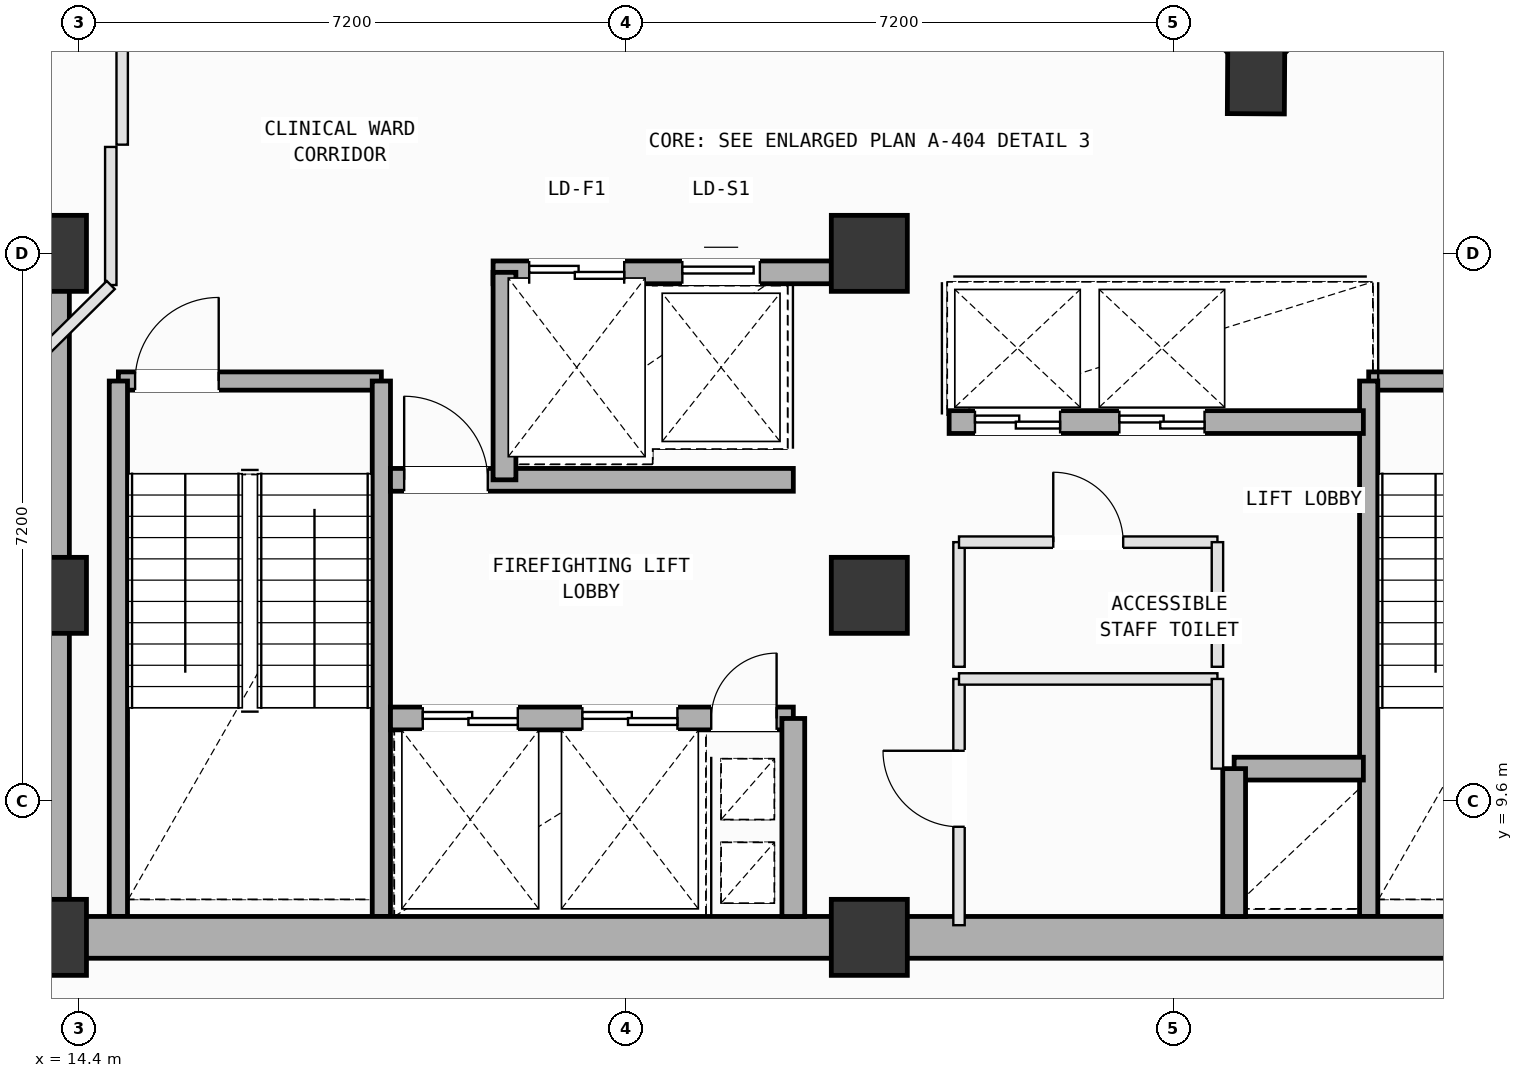
"""IFC4 building model, lengths in metres.
Left out: names, types, materials, properties, quantities, classifications, styles, units other than length and angle.
Written with IfcOpenShell. Run it as: python <this file> out.ifc"""

import sys

from ifc_helpers import new_model, si_unit, direction, frame, frame_2d, origin, origin_2d, place, context, subcontext, project, spatial, rectangle, extrude, element, fill, save


model = new_model("IFC4")
c1 = context("Model", 3, precision=1e-05, world=origin(), true_north=direction((0.0, 1.0)))
c2 = subcontext(c1, "Body", "Model", "MODEL_VIEW")
j1 = project(units=[si_unit("LENGTHUNIT", "METRE"), si_unit("PLANEANGLEUNIT", "RADIAN")], contexts=[c1])
p1 = place(None, origin())
s1 = spatial("IfcSite", under=j1, at=p1, CompositionType="ELEMENT")
p2 = place(p1, origin())
s2 = spatial("IfcBuilding", under=s1, at=p2, CompositionType="ELEMENT")
p3 = place(p2, frame((0.0, 0.0, 215.2)))
s3 = spatial("IfcBuildingStorey", under=s2, at=p3, CompositionType="ELEMENT", Elevation=215.2)
for number, where, z_axis, x_axis in (
    (1, (14.0, 7.8, 0.0), (0.0, 0.0, 1.0), (1.0, 0.0, 0.0)),
    (2, (14.0, 12.3, 0.0), (0.0, 0.0, 1.0), (1.0, 0.0, 0.0)),
    (3, (14.0, 16.8, 0.0), (0.0, 0.0, 1.0), (1.0, 0.0, 0.0)),
    (4, (24.8, 7.8, 0.0), (0.0, 0.0, 1.0), (1.0, 0.0, 0.0)),
    (5, (24.8, 12.3, 0.0), (0.0, 0.0, 1.0), (1.0, 0.0, 0.0)),
    (6, (24.8, 16.8, 0.0), (0.0, 0.0, 1.0), (1.0, 0.0, 0.0)),
):
    element("IfcColumn", number, at=place(p3, frame(where, z_axis=z_axis, x_axis=x_axis)), inside=s3, PredefinedType="COLUMN", context=c2, shape_type="SweptSolid", body=[
        extrude(rectangle(XDim=1.0, YDim=1.0, at=origin_2d()), origin(), (0.0, 0.0, 1.0), 4.0),
    ])
p4 = place(p3, frame((29.889, 19.236, 0.002), z_axis=(0.023205698391, -0.015144771581, 0.999615991997), x_axis=(-0.83375940471, 0.551432149195, 0.027709924051)))
e7 = element("IfcColumn", 7, at=p4, inside=s3, PredefinedType="COLUMN", context=c2, shape_type="SweptSolid", body=[
    extrude(rectangle(XDim=1.2, YDim=0.75, at=origin_2d()), origin(), (0.0, 0.0, 1.0), 3.998),
])
p5 = place(p3, frame((30.177, 19.521, 0.0), z_axis=(0.0, 0.0, 1.0), x_axis=(0.711415033641, 0.702772118051, 0.0)))
e8 = element("IfcWall", 8, at=p5, inside=s3, PredefinedType="SOLIDWALL", context=c2, shape_type="SweptSolid", body=[
    extrude(rectangle(XDim=6.158, YDim=0.28, at=frame_2d((3.079, 0.0))), origin(), (0.0, 0.0, 1.0), 3.165),
])
p6 = place(p5, frame((3.587, 0.0, 0.75)))
e9 = element("IfcOpeningElement", 9, at=p6, cuts=e8, PredefinedType="OPENING", context=c2, shape_type="SweptSolid", body=[
    extrude(rectangle(XDim=1.4, YDim=1.85, at=frame_2d((0.7, 0.925))), frame((0.0, 0.15, 0.0), z_axis=(0.0, -1.0, 0.0), x_axis=(1.0, 0.0, 0.0)), (0.0, 0.0, 1.0), 0.3),
])
p7 = place(p3, frame((24.758, 24.431, 0.0), z_axis=(0.0, 0.0, 1.0), x_axis=(0.702777784816, -0.711409435676, 0.0)))
e10 = element("IfcWall", 10, at=p7, inside=s3, PredefinedType="SOLIDWALL", context=c2, shape_type="SweptSolid", body=[
    extrude(rectangle(XDim=6.958, YDim=0.28, at=frame_2d((3.479, 0.0))), origin(), (0.0, 0.0, 1.0), 3.245),
])
p8 = place(p3, frame((14.92, 15.12, 0.0), z_axis=(0.0, 0.0, 1.0), x_axis=(1.0, 0.0, 0.0)))
e11 = element("IfcWall", 11, at=p8, inside=s3, PredefinedType="SOLIDWALL", context=c2, shape_type="SweptSolid", body=[
    extrude(rectangle(XDim=3.46, YDim=0.24, at=frame_2d((1.73, 0.0))), origin(), (0.0, 0.0, 1.0), 3.78),
])
p9 = place(p8, frame((0.22, 0.0, 0.0)))
e12 = element("IfcOpeningElement", 12, at=p9, cuts=e11, PredefinedType="OPENING", context=c2, shape_type="SweptSolid", body=[
    extrude(rectangle(XDim=1.1, YDim=2.15, at=frame_2d((0.55, 1.075))), frame((0.0, 0.13, 0.0), z_axis=(0.0, -1.0, 0.0), x_axis=(1.0, 0.0, 0.0)), (0.0, 0.0, 1.0), 0.26),
])
for number, where, z_axis, x_axis in (
    (13, (18.38, 15.12, 0.0), (0.0, 0.0, 1.0), (0.0, -1.0, 0.0)),
    (14, (14.92, 8.075, 0.0), (0.0, 0.0, 1.0), (0.0, 1.0, 0.0)),
):
    element("IfcWall", number, at=place(p3, frame(where, z_axis=z_axis, x_axis=x_axis)), inside=s3, PredefinedType="SOLIDWALL", context=c2, shape_type="SweptSolid", body=[
        extrude(rectangle(XDim=7.045, YDim=0.24, at=frame_2d((3.522, 0.0))), origin(), (0.0, 0.0, 1.0), 3.78),
    ])
p10 = place(p3, frame((31.37, 15.12, 0.0), z_axis=(0.0, 0.0, 1.0), x_axis=(1.0, 0.0, 0.0)))
e15 = element("IfcWall", 15, at=p10, inside=s3, PredefinedType="SOLIDWALL", context=c2, shape_type="SweptSolid", body=[
    extrude(rectangle(XDim=3.46, YDim=0.24, at=frame_2d((1.73, 0.0))), origin(), (0.0, 0.0, 1.0), 3.78),
])
p11 = place(p10, frame((2.14, 0.0, 0.0)))
e16 = element("IfcOpeningElement", 16, at=p11, cuts=e15, PredefinedType="OPENING", context=c2, shape_type="SweptSolid", body=[
    extrude(rectangle(XDim=1.1, YDim=2.15, at=frame_2d((0.55, 1.075))), frame((0.0, 0.13, 0.0), z_axis=(0.0, -1.0, 0.0), x_axis=(1.0, 0.0, 0.0)), (0.0, 0.0, 1.0), 0.26),
])
p12 = place(p3, frame((31.37, 8.075, 0.0), z_axis=(0.0, 0.0, 1.0), x_axis=(0.0, 1.0, 0.0)))
e17 = element("IfcWall", 17, at=p12, inside=s3, PredefinedType="SOLIDWALL", context=c2, shape_type="SweptSolid", body=[
    extrude(rectangle(XDim=7.045, YDim=0.24, at=frame_2d((3.522, 0.0))), origin(), (0.0, 0.0, 1.0), 3.78),
])
for number, where, z_axis, x_axis in (
    (18, (14.0, 7.8, 0.0), (0.0, 0.0, 1.0), (1.0, 0.0, 0.0)),
    (19, (24.8, 7.8, 0.0), (0.0, 0.0, 1.0), (1.0, 0.0, 0.0)),
):
    element("IfcWall", number, at=place(p3, frame(where, z_axis=z_axis, x_axis=x_axis)), inside=s3, PredefinedType="SHEAR", context=c2, shape_type="SweptSolid", body=[
        extrude(rectangle(XDim=10.8, YDim=0.55, at=frame_2d((5.4, 0.0))), origin(), (0.0, 0.0, 1.0), 3.78),
    ])
p13 = place(p3, frame((14.0, 16.8, 0.0), z_axis=(0.0, 0.0, 1.0), x_axis=(0.0, -1.0, 0.0)))
e20 = element("IfcWall", 20, at=p13, inside=s3, PredefinedType="SHEAR", context=c2, shape_type="SweptSolid", body=[
    extrude(rectangle(XDim=9.0, YDim=0.55, at=frame_2d((4.5, 0.0))), origin(), (0.0, 0.0, 1.0), 3.78),
])
p14 = place(p3, frame((19.85, 16.55, 0.0), z_axis=(0.0, 0.0, 1.0), x_axis=(1.0, 0.0, 0.0)))
e21 = element("IfcWall", 21, at=p14, inside=s3, PredefinedType="SOLIDWALL", context=c2, shape_type="SweptSolid", body=[
    extrude(rectangle(XDim=4.45, YDim=0.3, at=frame_2d((2.225, 0.0))), origin(), (0.0, 0.0, 1.0), 3.78),
])
p15 = place(p14, frame((0.475, 0.0, 0.0)))
e22 = element("IfcOpeningElement", 22, at=p15, cuts=e21, PredefinedType="OPENING", context=c2, shape_type="SweptSolid", body=[
    extrude(rectangle(XDim=1.25, YDim=2.18, at=frame_2d((0.625, 1.09))), frame((0.0, 0.16, 0.0), z_axis=(0.0, -1.0, 0.0), x_axis=(1.0, 0.0, 0.0)), (0.0, 0.0, 1.0), 0.32),
])
p16 = place(p14, frame((2.49, 0.0, 0.0)))
e23 = element("IfcOpeningElement", 23, at=p16, cuts=e21, PredefinedType="OPENING", context=c2, shape_type="SweptSolid", body=[
    extrude(rectangle(XDim=1.02, YDim=2.12, at=frame_2d((0.51, 1.06))), frame((0.0, 0.16, 0.0), z_axis=(0.0, -1.0, 0.0), x_axis=(1.0, 0.0, 0.0)), (0.0, 0.0, 1.0), 0.32),
])
p17 = place(p3, frame((18.5, 10.68, 0.0), z_axis=(0.0, 0.0, 1.0), x_axis=(1.0, 0.0, 0.0)))
e24 = element("IfcWall", 24, at=p17, inside=s3, PredefinedType="SOLIDWALL", context=c2, shape_type="SweptSolid", body=[
    extrude(rectangle(XDim=5.3, YDim=0.3, at=frame_2d((2.65, 0.0))), origin(), (0.0, 0.0, 1.0), 3.78),
])
p18 = place(p17, frame((4.22, 0.0, 0.0)))
e25 = element("IfcOpeningElement", 25, at=p18, cuts=e24, PredefinedType="OPENING", context=c2, shape_type="SweptSolid", body=[
    extrude(rectangle(XDim=0.86, YDim=2.06, at=frame_2d((0.43, 1.03))), frame((0.0, 0.16, 0.0), z_axis=(0.0, -1.0, 0.0), x_axis=(1.0, 0.0, 0.0)), (0.0, 0.0, 1.0), 0.32),
])
p19 = place(p17, frame((0.425, 0.0, 0.0)))
e26 = element("IfcOpeningElement", 26, at=p19, cuts=e24, PredefinedType="OPENING", context=c2, shape_type="SweptSolid", body=[
    extrude(rectangle(XDim=1.25, YDim=2.18, at=frame_2d((0.625, 1.09))), frame((0.0, 0.16, 0.0), z_axis=(0.0, -1.0, 0.0), x_axis=(1.0, 0.0, 0.0)), (0.0, 0.0, 1.0), 0.32),
])
p20 = place(p17, frame((2.525, 0.0, 0.0)))
e27 = element("IfcOpeningElement", 27, at=p20, cuts=e24, PredefinedType="OPENING", context=c2, shape_type="SweptSolid", body=[
    extrude(rectangle(XDim=1.25, YDim=2.18, at=frame_2d((0.625, 1.09))), frame((0.0, 0.16, 0.0), z_axis=(0.0, -1.0, 0.0), x_axis=(1.0, 0.0, 0.0)), (0.0, 0.0, 1.0), 0.32),
])
p21 = place(p3, frame((18.5, 13.82, 0.0), z_axis=(0.0, 0.0, 1.0), x_axis=(1.0, 0.0, 0.0)))
e28 = element("IfcWall", 28, at=p21, inside=s3, PredefinedType="SOLIDWALL", context=c2, shape_type="SweptSolid", body=[
    extrude(rectangle(XDim=5.3, YDim=0.3, at=frame_2d((2.65, 0.0))), origin(), (0.0, 0.0, 1.0), 3.78),
])
p22 = place(p21, frame((0.18, 0.0, 0.0)))
e29 = element("IfcOpeningElement", 29, at=p22, cuts=e28, PredefinedType="OPENING", context=c2, shape_type="SweptSolid", body=[
    extrude(rectangle(XDim=1.1, YDim=2.15, at=frame_2d((0.55, 1.075))), frame((0.0, 0.16, 0.0), z_axis=(0.0, -1.0, 0.0), x_axis=(1.0, 0.0, 0.0)), (0.0, 0.0, 1.0), 0.32),
])
p23 = place(p3, frame((23.8, 8.075, 0.0), z_axis=(0.0, 0.0, 1.0), x_axis=(0.0, 1.0, 0.0)))
e30 = element("IfcWall", 30, at=p23, inside=s3, PredefinedType="SOLIDWALL", context=c2, shape_type="SweptSolid", body=[
    extrude(rectangle(XDim=2.605, YDim=0.3, at=frame_2d((1.302, 0.0))), origin(), (0.0, 0.0, 1.0), 3.78),
])
p24 = place(p3, frame((20.0, 13.82, 0.0), z_axis=(0.0, 0.0, 1.0), x_axis=(0.0, 1.0, 0.0)))
e31 = element("IfcWall", 31, at=p24, inside=s3, PredefinedType="SOLIDWALL", context=c2, shape_type="SweptSolid", body=[
    extrude(rectangle(XDim=2.73, YDim=0.3, at=frame_2d((1.365, 0.0))), origin(), (0.0, 0.0, 1.0), 3.78),
])
p25 = place(p3, frame((29.6, 10.02, 0.0), z_axis=(0.0, 0.0, 1.0), x_axis=(1.0, 0.0, 0.0)))
e32 = element("IfcWall", 32, at=p25, inside=s3, PredefinedType="SOLIDWALL", context=c2, shape_type="SweptSolid", body=[
    extrude(rectangle(XDim=1.7, YDim=0.3, at=frame_2d((0.85, 0.0))), origin(), (0.0, 0.0, 1.0), 3.78),
])
p26 = place(p3, frame((29.6, 8.075, 0.0), z_axis=(0.0, 0.0, 1.0), x_axis=(0.0, 1.0, 0.0)))
e33 = element("IfcWall", 33, at=p26, inside=s3, PredefinedType="SOLIDWALL", context=c2, shape_type="SweptSolid", body=[
    extrude(rectangle(XDim=1.945, YDim=0.3, at=frame_2d((0.973, 0.0))), origin(), (0.0, 0.0, 1.0), 3.78),
])
p27 = place(p3, frame((25.85, 14.58, 0.0), z_axis=(0.0, 0.0, 1.0), x_axis=(1.0, 0.0, 0.0)))
e34 = element("IfcWall", 34, at=p27, inside=s3, PredefinedType="SOLIDWALL", context=c2, shape_type="SweptSolid", body=[
    extrude(rectangle(XDim=5.45, YDim=0.3, at=frame_2d((2.725, 0.0))), origin(), (0.0, 0.0, 1.0), 3.78),
])
p28 = place(p27, frame((0.34, 0.0, 0.0)))
e35 = element("IfcOpeningElement", 35, at=p28, cuts=e34, PredefinedType="OPENING", context=c2, shape_type="SweptSolid", body=[
    extrude(rectangle(XDim=1.12, YDim=2.15, at=frame_2d((0.56, 1.075))), frame((0.0, 0.16, 0.0), z_axis=(0.0, -1.0, 0.0), x_axis=(1.0, 0.0, 0.0)), (0.0, 0.0, 1.0), 0.32),
])
p29 = place(p27, frame((2.24, 0.0, 0.0)))
e36 = element("IfcOpeningElement", 36, at=p29, cuts=e34, PredefinedType="OPENING", context=c2, shape_type="SweptSolid", body=[
    extrude(rectangle(XDim=1.12, YDim=2.15, at=frame_2d((0.56, 1.075))), frame((0.0, 0.16, 0.0), z_axis=(0.0, -1.0, 0.0), x_axis=(1.0, 0.0, 0.0)), (0.0, 0.0, 1.0), 0.32),
])
p30 = place(p3, frame((25.98, 7.96, 0.0), z_axis=(0.0, 0.0, 1.0), x_axis=(0.0, 1.0, 0.0)))
e37 = element("IfcWall", 37, at=p30, inside=s3, PredefinedType="PARTITIONING", context=c2, shape_type="SweptSolid", body=[
    extrude(rectangle(XDim=3.24, YDim=0.15, at=frame_2d((1.62, 0.0))), origin(), (0.0, 0.0, 1.0), 3.78),
])
p31 = place(p30, frame((1.295, 0.0, 0.0)))
e38 = element("IfcOpeningElement", 38, at=p31, cuts=e37, PredefinedType="OPENING", context=c2, shape_type="SweptSolid", body=[
    extrude(rectangle(XDim=1.0, YDim=2.12, at=frame_2d((0.5, 1.06))), frame((0.0, 0.085, 0.0), z_axis=(0.0, -1.0, 0.0), x_axis=(1.0, 0.0, 0.0)), (0.0, 0.0, 1.0), 0.17),
])
p32 = place(p3, frame((25.98, 11.2, 0.0), z_axis=(0.0, 0.0, 1.0), x_axis=(1.0, 0.0, 0.0)))
e39 = element("IfcWall", 39, at=p32, inside=s3, PredefinedType="PARTITIONING", context=c2, shape_type="SweptSolid", body=[
    extrude(rectangle(XDim=3.4, YDim=0.15, at=frame_2d((1.7, 0.0))), origin(), (0.0, 0.0, 1.0), 3.78),
])
p33 = place(p3, frame((29.38, 11.2, 0.0), z_axis=(0.0, 0.0, 1.0), x_axis=(0.0, -1.0, 0.0)))
e40 = element("IfcWall", 40, at=p33, inside=s3, PredefinedType="PARTITIONING", context=c2, shape_type="SweptSolid", body=[
    extrude(rectangle(XDim=1.18, YDim=0.15, at=frame_2d((0.59, 0.0))), origin(), (0.0, 0.0, 1.0), 3.78),
])
p34 = place(p3, frame((25.98, 11.36, 0.0), z_axis=(0.0, 0.0, 1.0), x_axis=(0.0, 1.0, 0.0)))
e41 = element("IfcWall", 41, at=p34, inside=s3, PredefinedType="PARTITIONING", context=c2, shape_type="SweptSolid", body=[
    extrude(rectangle(XDim=1.64, YDim=0.15, at=frame_2d((0.82, 0.0))), origin(), (0.0, 0.0, 1.0), 3.78),
])
p35 = place(p3, frame((25.98, 13.0, 0.0), z_axis=(0.0, 0.0, 1.0), x_axis=(1.0, 0.0, 0.0)))
e42 = element("IfcWall", 42, at=p35, inside=s3, PredefinedType="PARTITIONING", context=c2, shape_type="SweptSolid", body=[
    extrude(rectangle(XDim=3.4, YDim=0.15, at=frame_2d((1.7, 0.0))), origin(), (0.0, 0.0, 1.0), 3.78),
])
p36 = place(p35, frame((1.24, 0.0, 0.0)))
e43 = element("IfcOpeningElement", 43, at=p36, cuts=e42, PredefinedType="OPENING", context=c2, shape_type="SweptSolid", body=[
    extrude(rectangle(XDim=0.92, YDim=2.1, at=frame_2d((0.46, 1.05))), frame((0.0, 0.085, 0.0), z_axis=(0.0, -1.0, 0.0), x_axis=(1.0, 0.0, 0.0)), (0.0, 0.0, 1.0), 0.17),
])
p37 = place(p3, frame((29.38, 13.0, 0.0), z_axis=(0.0, 0.0, 1.0), x_axis=(0.0, -1.0, 0.0)))
e44 = element("IfcWall", 44, at=p37, inside=s3, PredefinedType="PARTITIONING", context=c2, shape_type="SweptSolid", body=[
    extrude(rectangle(XDim=1.64, YDim=0.15, at=frame_2d((0.82, 0.0))), origin(), (0.0, 0.0, 1.0), 3.78),
])
p38 = place(p3, frame((14.97, 20.55, 0.0), z_axis=(0.0, 0.0, 1.0), x_axis=(0.0, -1.0, 0.0)))
e45 = element("IfcWall", 45, at=p38, inside=s3, PredefinedType="PARTITIONING", context=c2, shape_type="SweptSolid", body=[
    extrude(rectangle(XDim=2.32, YDim=0.15, at=frame_2d((1.16, 0.0))), origin(), (0.0, 0.0, 1.0), 3.78),
])
p39 = place(p3, frame((14.82, 18.2, 0.0), z_axis=(0.0, 0.0, 1.0), x_axis=(0.0, -1.0, 0.0)))
e46 = element("IfcWall", 46, at=p39, inside=s3, PredefinedType="PARTITIONING", context=c2, shape_type="SweptSolid", body=[
    extrude(rectangle(XDim=1.817, YDim=0.15, at=frame_2d((0.908, 0.0))), origin(), (0.0, 0.0, 1.0), 3.78),
])
p40 = place(p3, frame((14.82, 16.383, 0.0), z_axis=(0.0, 0.0, 1.0), x_axis=(-0.711463271884, -0.702723283206, 0.0)))
e47 = element("IfcWall", 47, at=p40, inside=s3, PredefinedType="PARTITIONING", context=c2, shape_type="SweptSolid", body=[
    extrude(rectangle(XDim=1.732, YDim=0.15, at=frame_2d((0.866, 0.0))), origin(), (0.0, 0.0, 1.0), 3.78),
])
p41 = place(p3, frame((5.544, 14.305, 0.0), z_axis=(0.0, 0.0, 1.0), x_axis=(0.711434510245, 0.702752401371, 0.0)))
e48 = element("IfcWall", 48, at=p41, inside=s3, PredefinedType="PARTITIONING", context=c2, shape_type="SweptSolid", body=[
    extrude(rectangle(XDim=15.185, YDim=0.15, at=frame_2d((7.592, 0.0))), origin(), (0.0, 0.0, 1.0), 3.78),
])
p42 = place(p9, origin())
e49 = element("IfcDoor", 49, at=p42, inside=s3, OperationType="SINGLE_SWING_RIGHT", PredefinedType="DOOR", context=c2, shape_type="SweptSolid", body=[
    extrude(rectangle(XDim=1.1, YDim=2.15, at=frame_2d((0.55, 1.075))), frame((0.0, 0.025, 0.0), z_axis=(0.0, -1.0, 0.0), x_axis=(1.0, 0.0, 0.0)), (0.0, 0.0, 1.0), 0.05),
])
fill(e12, e49)
p43 = place(p18, origin())
e50 = element("IfcDoor", 50, at=p43, inside=s3, OperationType="SINGLE_SWING_RIGHT", PredefinedType="DOOR", context=c2, shape_type="SweptSolid", body=[
    extrude(rectangle(XDim=0.86, YDim=2.06, at=frame_2d((0.43, 1.03))), frame((0.0, 0.025, 0.0), z_axis=(0.0, -1.0, 0.0), x_axis=(1.0, 0.0, 0.0)), (0.0, 0.0, 1.0), 0.05),
])
fill(e25, e50)
p44 = place(p22, origin())
e51 = element("IfcDoor", 51, at=p44, inside=s3, OperationType="SINGLE_SWING_LEFT", PredefinedType="DOOR", context=c2, shape_type="SweptSolid", body=[
    extrude(rectangle(XDim=1.1, YDim=2.15, at=frame_2d((0.55, 1.075))), frame((0.0, 0.025, 0.0), z_axis=(0.0, -1.0, 0.0), x_axis=(1.0, 0.0, 0.0)), (0.0, 0.0, 1.0), 0.05),
])
fill(e29, e51)
p45 = place(p19, origin())
e52 = element("IfcDoor", 52, at=p45, inside=s3, OperationType="DOUBLE_DOOR_SLIDING", PredefinedType="DOOR", context=c2, shape_type="SweptSolid", body=[
    extrude(rectangle(XDim=1.25, YDim=2.18, at=frame_2d((0.625, 1.09))), frame((0.0, 0.025, 0.0), z_axis=(0.0, -1.0, 0.0), x_axis=(1.0, 0.0, 0.0)), (0.0, 0.0, 1.0), 0.05),
])
fill(e26, e52)
p46 = place(p20, origin())
e53 = element("IfcDoor", 53, at=p46, inside=s3, OperationType="DOUBLE_DOOR_SLIDING", PredefinedType="DOOR", context=c2, shape_type="SweptSolid", body=[
    extrude(rectangle(XDim=1.25, YDim=2.18, at=frame_2d((0.625, 1.09))), frame((0.0, 0.025, 0.0), z_axis=(0.0, -1.0, 0.0), x_axis=(1.0, 0.0, 0.0)), (0.0, 0.0, 1.0), 0.05),
])
fill(e27, e53)
p47 = place(p28, origin())
e54 = element("IfcDoor", 54, at=p47, inside=s3, OperationType="DOUBLE_DOOR_SLIDING", PredefinedType="DOOR", context=c2, shape_type="SweptSolid", body=[
    extrude(rectangle(XDim=1.12, YDim=2.15, at=frame_2d((0.56, 1.075))), frame((0.0, 0.025, 0.0), z_axis=(0.0, -1.0, 0.0), x_axis=(1.0, 0.0, 0.0)), (0.0, 0.0, 1.0), 0.05),
])
fill(e35, e54)
p48 = place(p29, origin())
e55 = element("IfcDoor", 55, at=p48, inside=s3, OperationType="DOUBLE_DOOR_SLIDING", PredefinedType="DOOR", context=c2, shape_type="SweptSolid", body=[
    extrude(rectangle(XDim=1.12, YDim=2.15, at=frame_2d((0.56, 1.075))), frame((0.0, 0.025, 0.0), z_axis=(0.0, -1.0, 0.0), x_axis=(1.0, 0.0, 0.0)), (0.0, 0.0, 1.0), 0.05),
])
fill(e36, e55)
p49 = place(p15, origin())
e56 = element("IfcDoor", 56, at=p49, inside=s3, OperationType="DOUBLE_DOOR_SLIDING", PredefinedType="DOOR", context=c2, shape_type="SweptSolid", body=[
    extrude(rectangle(XDim=1.25, YDim=2.18, at=frame_2d((0.625, 1.09))), frame((0.0, 0.025, 0.0), z_axis=(0.0, -1.0, 0.0), x_axis=(1.0, 0.0, 0.0)), (0.0, 0.0, 1.0), 0.05),
])
fill(e22, e56)
p50 = place(p16, origin())
e57 = element("IfcDoor", 57, at=p50, inside=s3, OperationType="SLIDING_TO_LEFT", PredefinedType="DOOR", context=c2, shape_type="SweptSolid", body=[
    extrude(rectangle(XDim=1.02, YDim=2.12, at=frame_2d((0.51, 1.06))), frame((0.0, 0.025, 0.0), z_axis=(0.0, -1.0, 0.0), x_axis=(1.0, 0.0, 0.0)), (0.0, 0.0, 1.0), 0.05),
])
fill(e23, e57)
p51 = place(p31, origin())
e58 = element("IfcDoor", 58, at=p51, inside=s3, OperationType="SINGLE_SWING_RIGHT", PredefinedType="DOOR", context=c2, shape_type="SweptSolid", body=[
    extrude(rectangle(XDim=1.0, YDim=2.12, at=frame_2d((0.5, 1.06))), frame((0.0, 0.025, 0.0), z_axis=(0.0, -1.0, 0.0), x_axis=(1.0, 0.0, 0.0)), (0.0, 0.0, 1.0), 0.05),
])
fill(e38, e58)
p52 = place(p36, origin())
e59 = element("IfcDoor", 59, at=p52, inside=s3, OperationType="SINGLE_SWING_LEFT", PredefinedType="DOOR", context=c2, shape_type="SweptSolid", body=[
    extrude(rectangle(XDim=0.92, YDim=2.1, at=frame_2d((0.46, 1.05))), frame((0.0, 0.025, 0.0), z_axis=(0.0, -1.0, 0.0), x_axis=(1.0, 0.0, 0.0)), (0.0, 0.0, 1.0), 0.05),
])
fill(e43, e59)
save(model, sys.argv[1])
